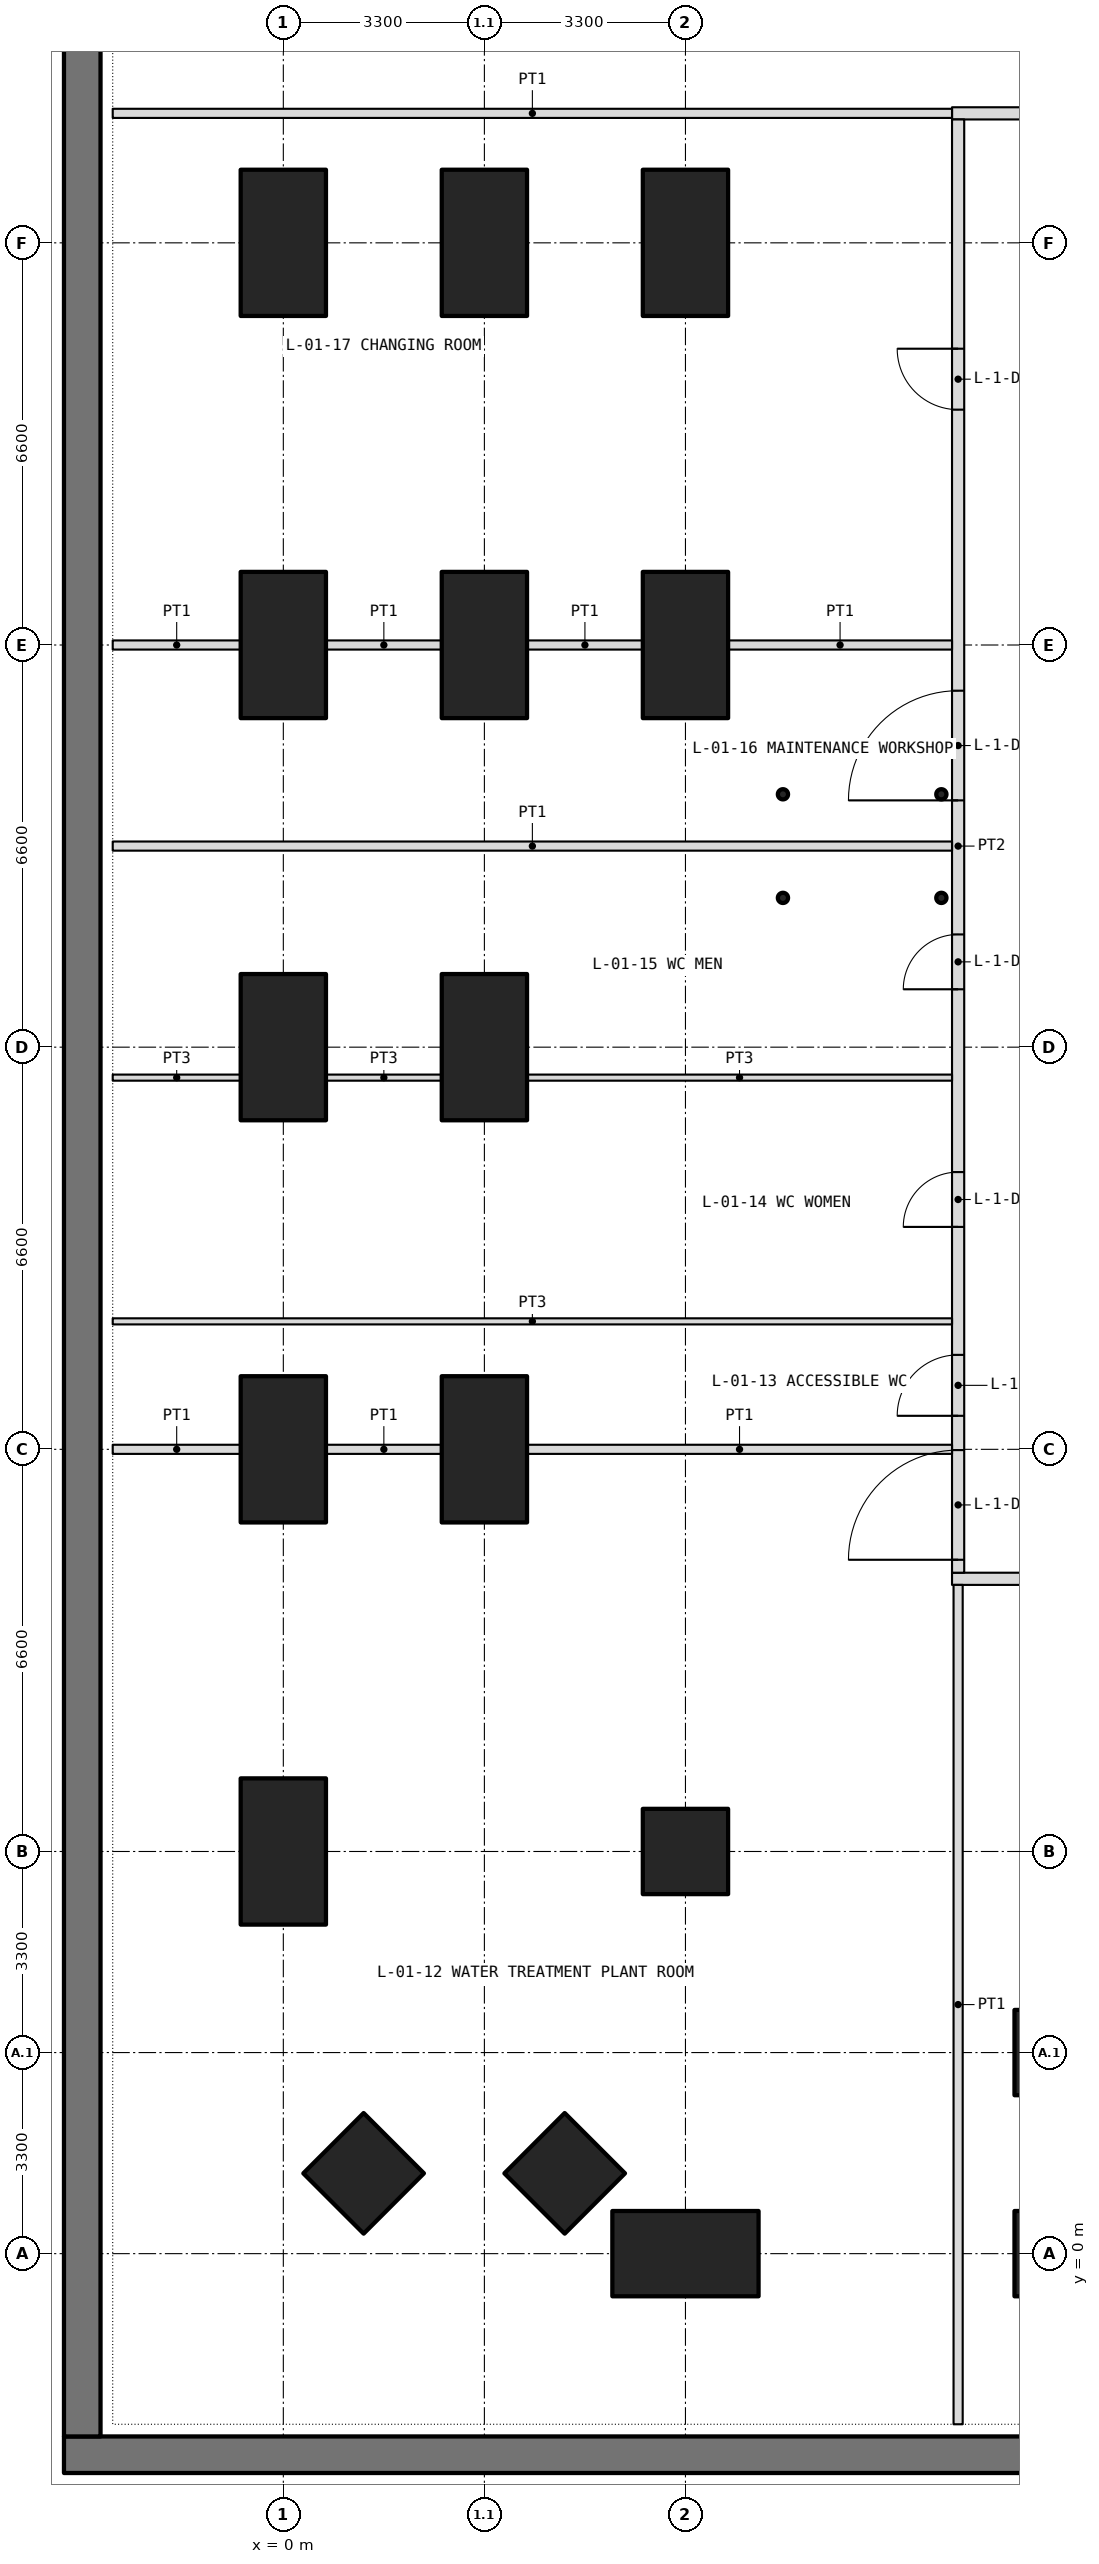
"""IFC4 building model, lengths in metres.
Left out: names, types, materials, properties, quantities, classifications, styles, units other than length and angle.
Written with IfcOpenShell. Run it as: python <this file> out.ifc"""

import sys

from ifc_helpers import new_model, si_unit, direction, frame, frame_2d, origin, origin_2d, place, context, subcontext, project, spatial, rectangle, hollow_circle, extrude, element, fill, save


model = new_model("IFC4")
c1 = context("Model", 3, precision=1e-05, world=origin(), true_north=direction((0.0, 1.0)))
c2 = subcontext(c1, "Body", "Model", "MODEL_VIEW")
j1 = project(units=[si_unit("LENGTHUNIT", "METRE"), si_unit("PLANEANGLEUNIT", "RADIAN")], contexts=[c1])
p1 = place(None, origin())
s1 = spatial("IfcSite", under=j1, at=p1, CompositionType="ELEMENT")
p2 = place(p1, origin())
s2 = spatial("IfcBuilding", under=s1, at=p2, CompositionType="ELEMENT")
p3 = place(p2, frame((0.0, 0.0, -5.4)))
s3 = spatial("IfcBuildingStorey", under=s2, at=p3, CompositionType="ELEMENT", Elevation=-5.4)
p4 = place(p3, frame((-3.6, -3.3, -0.15), z_axis=(0.0, 0.0, 1.0), x_axis=(1.0, 0.0, 0.0)))
e1 = element("IfcWall", 1, at=p4, inside=s3, PredefinedType="SOLIDWALL", context=c2, shape_type="SweptSolid", body=[
    extrude(rectangle(XDim=60.0, YDim=0.6, at=frame_2d((30.0, 0.0))), origin(), (0.0, 0.0, 1.0), 5.2),
])
p5 = place(p3, frame((-3.3, -3.0, -0.15), z_axis=(0.0, 0.0, 1.0), x_axis=(0.0, 1.0, 0.0)))
e2 = element("IfcWall", 2, at=p5, inside=s3, PredefinedType="SOLIDWALL", context=c2, shape_type="SweptSolid", body=[
    extrude(rectangle(XDim=52.2, YDim=0.6, at=frame_2d((26.1, 0.0))), origin(), (0.0, 0.0, 1.0), 5.2),
])
p6 = place(p3, frame((1.318, 1.318, -0.15), z_axis=(0.0, 0.0, 1.0), x_axis=(0.707106781187, 0.707106781187, 0.0)))
e3 = element("IfcColumn", 3, at=p6, inside=s3, PredefinedType="COLUMN", context=c2, shape_type="SweptSolid", body=[
    extrude(rectangle(XDim=1.4, YDim=1.4, at=origin_2d()), origin(), (0.0, 0.0, 1.0), 5.55),
])
for number, where, z_axis, x_axis in (
    (4, (6.6, 0.0, -0.15), (0.0, 0.0, 1.0), (1.0, 0.0, 0.0)),
    (5, (13.2, 0.0, -0.15), (0.0, 0.0, 1.0), (1.0, 0.0, 0.0)),
    (6, (0.0, 6.6, -0.15), (0.0, 0.0, 1.0), (0.0, 1.0, 0.0)),
    (7, (0.0, 13.2, -0.15), (0.0, 0.0, 1.0), (0.0, 1.0, 0.0)),
    (8, (0.0, 19.8, -0.15), (0.0, 0.0, 1.0), (0.0, 1.0, 0.0)),
    (9, (0.0, 26.4, -0.15), (0.0, 0.0, 1.0), (0.0, 1.0, 0.0)),
    (10, (0.0, 33.0, -0.15), (0.0, 0.0, 1.0), (0.0, 1.0, 0.0)),
):
    element("IfcColumn", number, at=place(p3, frame(where, z_axis=z_axis, x_axis=x_axis)), inside=s3, PredefinedType="COLUMN", context=c2, shape_type="SweptSolid", body=[
        extrude(rectangle(XDim=2.4, YDim=1.4, at=origin_2d()), origin(), (0.0, 0.0, 1.0), 5.55),
    ])
for number, where, z_axis, x_axis in (
    (11, (6.6, 6.6, -0.15), (0.0, 0.0, 1.0), (1.0, 0.0, 0.0)),
    (12, (4.618, 1.318, -0.15), (0.0, 0.0, 1.0), (0.707, 0.707, 0.0)),
):
    element("IfcColumn", number, at=place(p3, frame(where, z_axis=z_axis, x_axis=x_axis)), inside=s3, PredefinedType="COLUMN", context=c2, shape_type="SweptSolid", body=[
        extrude(rectangle(XDim=1.4, YDim=1.4, at=origin_2d()), origin(), (0.0, 0.0, 1.0), 5.55),
    ])
for number, where, z_axis, x_axis in (
    (13, (3.3, 13.2, -0.15), (0.0, 0.0, 1.0), (0.0, 1.0, 0.0)),
    (14, (3.3, 19.8, -0.15), (0.0, 0.0, 1.0), (0.0, 1.0, 0.0)),
    (15, (3.3, 26.4, -0.15), (0.0, 0.0, 1.0), (0.0, 1.0, 0.0)),
    (16, (3.3, 33.0, -0.15), (0.0, 0.0, 1.0), (0.0, 1.0, 0.0)),
    (17, (13.2, 3.3, -0.15), (0.0, 0.0, 1.0), (1.0, 0.0, 0.0)),
    (18, (6.6, 26.4, -0.15), (0.0, 0.0, 1.0), (0.0, 1.0, 0.0)),
    (19, (6.6, 33.0, -0.15), (0.0, 0.0, 1.0), (0.0, 1.0, 0.0)),
):
    element("IfcColumn", number, at=place(p3, frame(where, z_axis=z_axis, x_axis=x_axis)), inside=s3, PredefinedType="COLUMN", context=c2, shape_type="SweptSolid", body=[
        extrude(rectangle(XDim=2.4, YDim=1.4, at=origin_2d()), origin(), (0.0, 0.0, 1.0), 5.55),
    ])
p7 = place(p3, frame((10.975, 11.075, 0.0), z_axis=(0.0, 0.0, 1.0), x_axis=(1.0, 0.0, 0.0)))
e20 = element("IfcWall", 20, at=p7, inside=s3, PredefinedType="PARTITIONING", context=c2, shape_type="SweptSolid", body=[
    extrude(rectangle(XDim=30.85, YDim=0.2, at=frame_2d((15.425, 0.0))), origin(), (0.0, 0.0, 1.0), 4.05),
])
p8 = place(p7, frame((3.562, 0.0, 0.0)))
e21 = element("IfcOpeningElement", 21, at=p8, cuts=e20, PredefinedType="OPENING", context=c2, shape_type="SweptSolid", body=[
    extrude(rectangle(XDim=1.8, YDim=2.4, at=frame_2d((0.9, 1.2))), frame((0.0, 0.11, 0.0), z_axis=(0.0, -1.0, 0.0), x_axis=(1.0, 0.0, 0.0)), (0.0, 0.0, 1.0), 0.22),
])
p9 = place(p7, frame((14.525, 0.0, 0.0)))
e22 = element("IfcOpeningElement", 22, at=p9, cuts=e20, PredefinedType="OPENING", context=c2, shape_type="SweptSolid", body=[
    extrude(rectangle(XDim=1.8, YDim=2.4, at=frame_2d((0.9, 1.2))), frame((0.0, 0.11, 0.0), z_axis=(0.0, -1.0, 0.0), x_axis=(1.0, 0.0, 0.0)), (0.0, 0.0, 1.0), 0.22),
])
p10 = place(p7, frame((25.488, 0.0, 0.0)))
e23 = element("IfcOpeningElement", 23, at=p10, cuts=e20, PredefinedType="OPENING", context=c2, shape_type="SweptSolid", body=[
    extrude(rectangle(XDim=1.8, YDim=2.4, at=frame_2d((0.9, 1.2))), frame((0.0, 0.11, 0.0), z_axis=(0.0, -1.0, 0.0), x_axis=(1.0, 0.0, 0.0)), (0.0, 0.0, 1.0), 0.22),
])
p11 = place(p3, frame((10.975, 35.125, 0.0), z_axis=(0.0, 0.0, 1.0), x_axis=(1.0, 0.0, 0.0)))
e24 = element("IfcWall", 24, at=p11, inside=s3, PredefinedType="PARTITIONING", context=c2, shape_type="SweptSolid", body=[
    extrude(rectangle(XDim=30.85, YDim=0.2, at=frame_2d((15.425, 0.0))), origin(), (0.0, 0.0, 1.0), 4.05),
])
p12 = place(p11, frame((3.962, 0.0, 0.0)))
e25 = element("IfcOpeningElement", 25, at=p12, cuts=e24, PredefinedType="OPENING", context=c2, shape_type="SweptSolid", body=[
    extrude(rectangle(XDim=1.0, YDim=2.1, at=frame_2d((0.5, 1.05))), frame((0.0, 0.11, 0.0), z_axis=(0.0, -1.0, 0.0), x_axis=(1.0, 0.0, 0.0)), (0.0, 0.0, 1.0), 0.22),
])
p13 = place(p11, frame((14.925, 0.0, 0.0)))
e26 = element("IfcOpeningElement", 26, at=p13, cuts=e24, PredefinedType="OPENING", context=c2, shape_type="SweptSolid", body=[
    extrude(rectangle(XDim=1.0, YDim=2.1, at=frame_2d((0.5, 1.05))), frame((0.0, 0.11, 0.0), z_axis=(0.0, -1.0, 0.0), x_axis=(1.0, 0.0, 0.0)), (0.0, 0.0, 1.0), 0.22),
])
p14 = place(p11, frame((25.887, 0.0, 0.0)))
e27 = element("IfcOpeningElement", 27, at=p14, cuts=e24, PredefinedType="OPENING", context=c2, shape_type="SweptSolid", body=[
    extrude(rectangle(XDim=1.0, YDim=2.1, at=frame_2d((0.5, 1.05))), frame((0.0, 0.11, 0.0), z_axis=(0.0, -1.0, 0.0), x_axis=(1.0, 0.0, 0.0)), (0.0, 0.0, 1.0), 0.22),
])
p15 = place(p3, frame((11.075, 11.175, 0.0), z_axis=(0.0, 0.0, 1.0), x_axis=(0.0, 1.0, 0.0)))
e28 = element("IfcWall", 28, at=p15, inside=s3, PredefinedType="PARTITIONING", context=c2, shape_type="SweptSolid", body=[
    extrude(rectangle(XDim=23.85, YDim=0.2, at=frame_2d((11.925, 0.0))), origin(), (0.0, 0.0, 1.0), 4.05),
])
p16 = place(p15, frame((0.212, 0.0, 0.0)))
e29 = element("IfcOpeningElement", 29, at=p16, cuts=e28, PredefinedType="OPENING", context=c2, shape_type="SweptSolid", body=[
    extrude(rectangle(XDim=1.8, YDim=2.4, at=frame_2d((0.9, 1.2))), frame((0.0, 0.11, 0.0), z_axis=(0.0, -1.0, 0.0), x_axis=(1.0, 0.0, 0.0)), (0.0, 0.0, 1.0), 0.22),
])
p17 = place(p15, frame((2.575, 0.0, 0.0)))
e30 = element("IfcOpeningElement", 30, at=p17, cuts=e28, PredefinedType="OPENING", context=c2, shape_type="SweptSolid", body=[
    extrude(rectangle(XDim=1.0, YDim=2.1, at=frame_2d((0.5, 1.05))), frame((0.0, 0.11, 0.0), z_axis=(0.0, -1.0, 0.0), x_axis=(1.0, 0.0, 0.0)), (0.0, 0.0, 1.0), 0.22),
])
p18 = place(p15, frame((5.675, 0.0, 0.0)))
e31 = element("IfcOpeningElement", 31, at=p18, cuts=e28, PredefinedType="OPENING", context=c2, shape_type="SweptSolid", body=[
    extrude(rectangle(XDim=0.9, YDim=2.1, at=frame_2d((0.45, 1.05))), frame((0.0, 0.11, 0.0), z_axis=(0.0, -1.0, 0.0), x_axis=(1.0, 0.0, 0.0)), (0.0, 0.0, 1.0), 0.22),
])
p19 = place(p15, frame((9.575, 0.0, 0.0)))
e32 = element("IfcOpeningElement", 32, at=p19, cuts=e28, PredefinedType="OPENING", context=c2, shape_type="SweptSolid", body=[
    extrude(rectangle(XDim=0.9, YDim=2.1, at=frame_2d((0.45, 1.05))), frame((0.0, 0.11, 0.0), z_axis=(0.0, -1.0, 0.0), x_axis=(1.0, 0.0, 0.0)), (0.0, 0.0, 1.0), 0.22),
])
p20 = place(p15, frame((12.675, 0.0, 0.0)))
e33 = element("IfcOpeningElement", 33, at=p20, cuts=e28, PredefinedType="OPENING", context=c2, shape_type="SweptSolid", body=[
    extrude(rectangle(XDim=1.8, YDim=2.4, at=frame_2d((0.9, 1.2))), frame((0.0, 0.11, 0.0), z_axis=(0.0, -1.0, 0.0), x_axis=(1.0, 0.0, 0.0)), (0.0, 0.0, 1.0), 0.22),
])
p21 = place(p15, frame((19.087, 0.0, 0.0)))
e34 = element("IfcOpeningElement", 34, at=p21, cuts=e28, PredefinedType="OPENING", context=c2, shape_type="SweptSolid", body=[
    extrude(rectangle(XDim=1.0, YDim=2.1, at=frame_2d((0.5, 1.05))), frame((0.0, 0.11, 0.0), z_axis=(0.0, -1.0, 0.0), x_axis=(1.0, 0.0, 0.0)), (0.0, 0.0, 1.0), 0.22),
])
for number, where, z_axis, x_axis in (
    (35, (11.075, -2.8, 0.0), (0.0, 0.0, 1.0), (0.0, 1.0, 0.0)),
    (36, (-2.8, 35.125, 0.0), (0.0, 0.0, 1.0), (1.0, 0.0, 0.0)),
):
    element("IfcWall", number, at=place(p3, frame(where, z_axis=z_axis, x_axis=x_axis)), inside=s3, PredefinedType="PARTITIONING", context=c2, shape_type="SweptSolid", body=[
        extrude(rectangle(XDim=13.775, YDim=0.15, at=frame_2d((6.888, 0.0))), origin(), (0.0, 0.0, 1.0), 3.85),
    ])
p22 = place(p3, frame((-2.8, 15.3, 0.0), z_axis=(0.0, 0.0, 1.0), x_axis=(1.0, 0.0, 0.0)))
e37 = element("IfcWall", 37, at=p22, inside=s3, PredefinedType="PARTITIONING", context=c2, shape_type="SweptSolid", body=[
    extrude(rectangle(XDim=13.775, YDim=0.1, at=frame_2d((6.888, 0.0))), origin(), (0.0, 0.0, 1.0), 3.85),
])
p23 = place(p3, frame((-2.8, 19.3, 0.0), z_axis=(0.0, 0.0, 1.0), x_axis=(1.0, 0.0, 0.0)))
e38 = element("IfcWall", 38, at=p23, inside=s3, PredefinedType="PARTITIONING", context=c2, shape_type="SweptSolid", body=[
    extrude(rectangle(XDim=2.1, YDim=0.1, at=frame_2d((1.05, 0.0))), origin(), (0.0, 0.0, 1.0), 5.05),
])
p24 = place(p3, frame((0.7, 19.3, 0.0), z_axis=(0.0, 0.0, 1.0), x_axis=(1.0, 0.0, 0.0)))
e39 = element("IfcWall", 39, at=p24, inside=s3, PredefinedType="PARTITIONING", context=c2, shape_type="SweptSolid", body=[
    extrude(rectangle(XDim=1.9, YDim=0.1, at=frame_2d((0.95, 0.0))), origin(), (0.0, 0.0, 1.0), 4.05),
])
p25 = place(p3, frame((4.0, 19.3, 0.0), z_axis=(0.0, 0.0, 1.0), x_axis=(1.0, 0.0, 0.0)))
e40 = element("IfcWall", 40, at=p25, inside=s3, PredefinedType="PARTITIONING", context=c2, shape_type="SweptSolid", body=[
    extrude(rectangle(XDim=6.975, YDim=0.1, at=frame_2d((3.488, 0.0))), origin(), (0.0, 0.0, 1.0), 4.05),
])
p26 = place(p3, frame((-2.8, 23.1, 0.0), z_axis=(0.0, 0.0, 1.0), x_axis=(1.0, 0.0, 0.0)))
e41 = element("IfcWall", 41, at=p26, inside=s3, PredefinedType="PARTITIONING", context=c2, shape_type="SweptSolid", body=[
    extrude(rectangle(XDim=13.775, YDim=0.15, at=frame_2d((6.888, 0.0))), origin(), (0.0, 0.0, 1.0), 3.85),
])
p27 = place(p3, frame((-2.8, 13.2, 0.0), z_axis=(0.0, 0.0, 1.0), x_axis=(1.0, 0.0, 0.0)))
e42 = element("IfcWall", 42, at=p27, inside=s3, PredefinedType="PARTITIONING", context=c2, shape_type="SweptSolid", body=[
    extrude(rectangle(XDim=2.1, YDim=0.15, at=frame_2d((1.05, 0.0))), origin(), (0.0, 0.0, 1.0), 4.05),
])
p28 = place(p3, frame((0.7, 13.2, 0.0), z_axis=(0.0, 0.0, 1.0), x_axis=(1.0, 0.0, 0.0)))
e43 = element("IfcWall", 43, at=p28, inside=s3, PredefinedType="PARTITIONING", context=c2, shape_type="SweptSolid", body=[
    extrude(rectangle(XDim=1.9, YDim=0.15, at=frame_2d((0.95, 0.0))), origin(), (0.0, 0.0, 1.0), 4.05),
])
p29 = place(p3, frame((4.0, 13.2, 0.0), z_axis=(0.0, 0.0, 1.0), x_axis=(1.0, 0.0, 0.0)))
e44 = element("IfcWall", 44, at=p29, inside=s3, PredefinedType="PARTITIONING", context=c2, shape_type="SweptSolid", body=[
    extrude(rectangle(XDim=6.975, YDim=0.15, at=frame_2d((3.488, 0.0))), origin(), (0.0, 0.0, 1.0), 4.05),
])
p30 = place(p3, frame((-2.8, 26.4, 0.0), z_axis=(0.0, 0.0, 1.0), x_axis=(1.0, 0.0, 0.0)))
e45 = element("IfcWall", 45, at=p30, inside=s3, PredefinedType="PARTITIONING", context=c2, shape_type="SweptSolid", body=[
    extrude(rectangle(XDim=2.1, YDim=0.15, at=frame_2d((1.05, 0.0))), origin(), (0.0, 0.0, 1.0), 4.05),
])
p31 = place(p3, frame((0.7, 26.4, 0.0), z_axis=(0.0, 0.0, 1.0), x_axis=(1.0, 0.0, 0.0)))
e46 = element("IfcWall", 46, at=p31, inside=s3, PredefinedType="PARTITIONING", context=c2, shape_type="SweptSolid", body=[
    extrude(rectangle(XDim=1.9, YDim=0.15, at=frame_2d((0.95, 0.0))), origin(), (0.0, 0.0, 1.0), 4.05),
])
p32 = place(p3, frame((4.0, 26.4, 0.0), z_axis=(0.0, 0.0, 1.0), x_axis=(1.0, 0.0, 0.0)))
e47 = element("IfcWall", 47, at=p32, inside=s3, PredefinedType="PARTITIONING", context=c2, shape_type="SweptSolid", body=[
    extrude(rectangle(XDim=1.9, YDim=0.15, at=frame_2d((0.95, 0.0))), origin(), (0.0, 0.0, 1.0), 4.05),
])
p33 = place(p3, frame((7.3, 26.4, 0.0), z_axis=(0.0, 0.0, 1.0), x_axis=(1.0, 0.0, 0.0)))
e48 = element("IfcWall", 48, at=p33, inside=s3, PredefinedType="PARTITIONING", context=c2, shape_type="SweptSolid", body=[
    extrude(rectangle(XDim=3.675, YDim=0.15, at=frame_2d((1.837, 0.0))), origin(), (0.0, 0.0, 1.0), 4.05),
])
for number, where, z_axis, x_axis in (
    (49, (8.2, 22.25, 0.0), (0.0, 0.0, 1.0), (1.0, 0.0, 0.0)),
    (50, (10.8, 22.25, 0.0), (0.0, 0.0, 1.0), (1.0, 0.0, 0.0)),
    (51, (10.8, 23.95, 0.0), (0.0, 0.0, 1.0), (1.0, 0.0, 0.0)),
    (52, (8.2, 23.95, 0.0), (0.0, 0.0, 1.0), (1.0, 0.0, 0.0)),
):
    element("IfcColumn", number, at=place(p3, frame(where, z_axis=z_axis, x_axis=x_axis)), inside=s3, PredefinedType="COLUMN", context=c2, shape_type="SweptSolid", body=[
        extrude(hollow_circle(Radius=0.084, WallThickness=0.008, at=origin_2d()), origin(), (0.0, 0.0, 1.0), 5.05),
    ])
p34 = place(p16, origin())
e53 = element("IfcDoor", 53, at=p34, inside=s3, OperationType="DOUBLE_DOOR_SINGLE_SWING", PredefinedType="DOOR", context=c2, shape_type="SweptSolid", body=[
    extrude(rectangle(XDim=1.8, YDim=2.4, at=frame_2d((0.9, 1.2))), frame((0.0, 0.025, 0.0), z_axis=(0.0, -1.0, 0.0), x_axis=(1.0, 0.0, 0.0)), (0.0, 0.0, 1.0), 0.05),
])
fill(e29, e53)
p35 = place(p17, origin())
e54 = element("IfcDoor", 54, at=p35, inside=s3, OperationType="SINGLE_SWING_LEFT", PredefinedType="DOOR", context=c2, shape_type="SweptSolid", body=[
    extrude(rectangle(XDim=1.0, YDim=2.1, at=frame_2d((0.5, 1.05))), frame((0.0, 0.025, 0.0), z_axis=(0.0, -1.0, 0.0), x_axis=(1.0, 0.0, 0.0)), (0.0, 0.0, 1.0), 0.05),
])
fill(e30, e54)
p36 = place(p18, origin())
e55 = element("IfcDoor", 55, at=p36, inside=s3, OperationType="SINGLE_SWING_LEFT", PredefinedType="DOOR", context=c2, shape_type="SweptSolid", body=[
    extrude(rectangle(XDim=0.9, YDim=2.1, at=frame_2d((0.45, 1.05))), frame((0.0, 0.025, 0.0), z_axis=(0.0, -1.0, 0.0), x_axis=(1.0, 0.0, 0.0)), (0.0, 0.0, 1.0), 0.05),
])
fill(e31, e55)
p37 = place(p19, origin())
e56 = element("IfcDoor", 56, at=p37, inside=s3, OperationType="SINGLE_SWING_LEFT", PredefinedType="DOOR", context=c2, shape_type="SweptSolid", body=[
    extrude(rectangle(XDim=0.9, YDim=2.1, at=frame_2d((0.45, 1.05))), frame((0.0, 0.025, 0.0), z_axis=(0.0, -1.0, 0.0), x_axis=(1.0, 0.0, 0.0)), (0.0, 0.0, 1.0), 0.05),
])
fill(e32, e56)
p38 = place(p20, origin())
e57 = element("IfcDoor", 57, at=p38, inside=s3, OperationType="DOUBLE_DOOR_SINGLE_SWING", PredefinedType="DOOR", context=c2, shape_type="SweptSolid", body=[
    extrude(rectangle(XDim=1.8, YDim=2.4, at=frame_2d((0.9, 1.2))), frame((0.0, 0.025, 0.0), z_axis=(0.0, -1.0, 0.0), x_axis=(1.0, 0.0, 0.0)), (0.0, 0.0, 1.0), 0.05),
])
fill(e33, e57)
p39 = place(p21, origin())
e58 = element("IfcDoor", 58, at=p39, inside=s3, OperationType="SINGLE_SWING_RIGHT", PredefinedType="DOOR", context=c2, shape_type="SweptSolid", body=[
    extrude(rectangle(XDim=1.0, YDim=2.1, at=frame_2d((0.5, 1.05))), frame((0.0, 0.025, 0.0), z_axis=(0.0, -1.0, 0.0), x_axis=(1.0, 0.0, 0.0)), (0.0, 0.0, 1.0), 0.05),
])
fill(e34, e58)
save(model, sys.argv[1])
